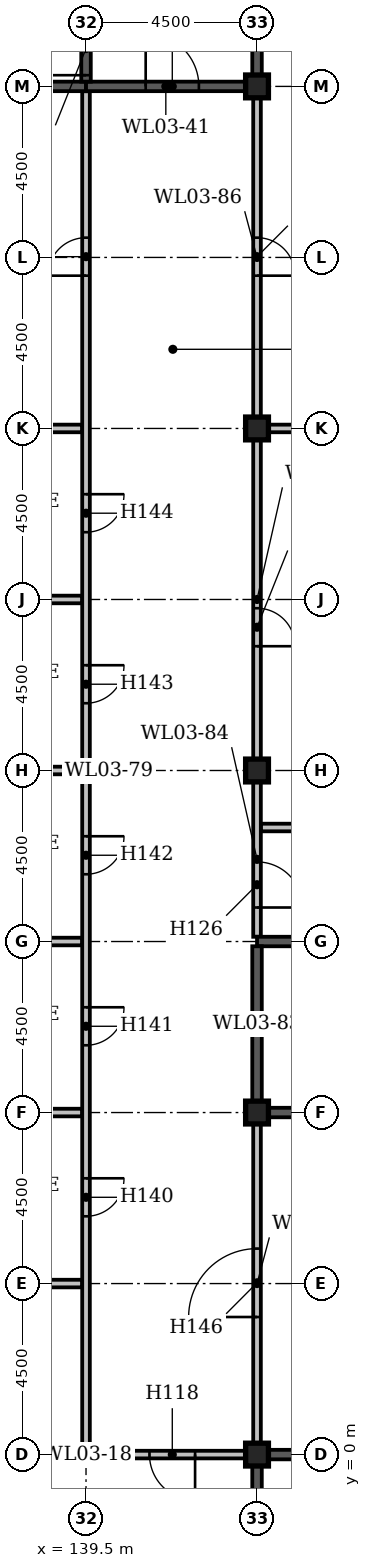
"""IFC4 building model, lengths in metres.
Left out: names, types, materials, properties, quantities, classifications, styles, units other than length and angle.
Written with IfcOpenShell. Run it as: python <this file> out.ifc"""

import sys

from ifc_helpers import new_model, si_unit, direction, frame, frame_2d, origin, origin_2d, place, context, subcontext, project, spatial, rectangle, extrude, element, fill, save


model = new_model("IFC4")
c1 = context("Model", 3, precision=1e-05, world=origin(), true_north=direction((0.0, 1.0)))
c2 = subcontext(c1, "Body", "Model", "MODEL_VIEW")
j1 = project(units=[si_unit("LENGTHUNIT", "METRE"), si_unit("PLANEANGLEUNIT", "RADIAN")], contexts=[c1])
p1 = place(None, origin())
s1 = spatial("IfcSite", under=j1, at=p1, CompositionType="ELEMENT")
p2 = place(p1, origin())
s2 = spatial("IfcBuilding", under=s1, at=p2, CompositionType="ELEMENT")
p3 = place(p2, frame((0.0, 0.0, 19.0)))
s3 = spatial("IfcBuildingStorey", under=s2, at=p3, CompositionType="ELEMENT", Elevation=19.0)
for number, where, z_axis, x_axis in (
    (1, (144.0, 0.0, 0.0), (0.0, 0.0, 1.0), (1.0, 0.0, 0.0)),
    (2, (144.0, 9.0, 0.0), (0.0, 0.0, 1.0), (1.0, 0.0, 0.0)),
    (3, (144.0, 18.0, 0.0), (0.0, 0.0, 1.0), (1.0, 0.0, 0.0)),
    (4, (144.0, 27.0, 0.0), (0.0, 0.0, 1.0), (1.0, 0.0, 0.0)),
    (5, (144.0, 36.0, 0.0), (0.0, 0.0, 1.0), (1.0, 0.0, 0.0)),
):
    element("IfcColumn", number, at=place(p3, frame(where, z_axis=z_axis, x_axis=x_axis)), inside=s3, PredefinedType="COLUMN", context=c2, shape_type="SweptSolid", body=[
        extrude(rectangle(XDim=0.6, YDim=0.6, at=origin_2d()), origin(), (0.0, 0.0, 1.0), 4.7),
    ])
p4 = place(p3, frame((135.4, 0.0, 0.0), z_axis=(0.0, 0.0, 1.0), x_axis=(1.0, 0.0, 0.0)))
e6 = element("IfcWall", 6, at=p4, inside=s3, PredefinedType="STANDARD", context=c2, shape_type="SweptSolid", body=[
    extrude(rectangle(XDim=8.3, YDim=0.2, at=frame_2d((4.15, 0.0))), origin(), (0.0, 0.0, 1.0), 4.7),
])
p5 = place(p4, frame((5.77, 0.0, 0.0)))
e7 = element("IfcOpeningElement", 7, at=p5, cuts=e6, PredefinedType="OPENING", context=c2, shape_type="SweptSolid", body=[
    extrude(rectangle(XDim=1.2, YDim=2.1, at=frame_2d((0.6, 1.05))), frame((0.0, 0.112, 0.0), z_axis=(0.0, -1.0, 0.0), x_axis=(1.0, 0.0, 0.0)), (0.0, 0.0, 1.0), 0.224),
])
p6 = place(p4, frame((1.37, 0.0, 0.0)))
e8 = element("IfcOpeningElement", 8, at=p6, cuts=e6, PredefinedType="OPENING", context=c2, shape_type="SweptSolid", body=[
    extrude(rectangle(XDim=1.0, YDim=2.1, at=frame_2d((0.5, 1.05))), frame((0.0, 0.112, 0.0), z_axis=(0.0, -1.0, 0.0), x_axis=(1.0, 0.0, 0.0)), (0.0, 0.0, 1.0), 0.224),
])
p7 = place(p3, frame((144.3, 0.0, 0.0), z_axis=(0.0, 0.0, 1.0), x_axis=(1.0, 0.0, 0.0)))
e9 = element("IfcWall", 9, at=p7, inside=s3, PredefinedType="STANDARD", context=c2, shape_type="SweptSolid", body=[
    extrude(rectangle(XDim=4.2, YDim=0.25, at=frame_2d((2.1, 0.0))), origin(), (0.0, 0.0, 1.0), 5.0),
])
p8 = place(p3, frame((135.25, 4.5, 0.0), z_axis=(0.0, 0.0, 1.0), x_axis=(1.0, 0.0, 0.0)))
e10 = element("IfcWall", 10, at=p8, inside=s3, PredefinedType="STANDARD", context=c2, shape_type="SweptSolid", body=[
    extrude(rectangle(XDim=4.15, YDim=0.2, at=frame_2d((2.075, 0.0))), origin(), (0.0, 0.0, 1.0), 4.7),
])
p9 = place(p3, frame((135.4, 9.0, 0.0), z_axis=(0.0, 0.0, 1.0), x_axis=(1.0, 0.0, 0.0)))
e11 = element("IfcWall", 11, at=p9, inside=s3, PredefinedType="STANDARD", context=c2, shape_type="SweptSolid", body=[
    extrude(rectangle(XDim=4.0, YDim=0.2, at=frame_2d((2.0, 0.0))), origin(), (0.0, 0.0, 1.0), 4.7),
])
p10 = place(p3, frame((144.3, 9.0, 0.0), z_axis=(0.0, 0.0, 1.0), x_axis=(1.0, 0.0, 0.0)))
e12 = element("IfcWall", 12, at=p10, inside=s3, PredefinedType="STANDARD", context=c2, shape_type="SweptSolid", body=[
    extrude(rectangle(XDim=4.2, YDim=0.25, at=frame_2d((2.1, 0.0))), origin(), (0.0, 0.0, 1.0), 5.0),
])
p11 = place(p3, frame((135.25, 13.5, 0.0), z_axis=(0.0, 0.0, 1.0), x_axis=(1.0, 0.0, 0.0)))
e13 = element("IfcWall", 13, at=p11, inside=s3, PredefinedType="STANDARD", context=c2, shape_type="SweptSolid", body=[
    extrude(rectangle(XDim=4.15, YDim=0.2, at=frame_2d((2.075, 0.0))), origin(), (0.0, 0.0, 1.0), 4.7),
])
p12 = place(p3, frame((144.0, 13.5, 0.0), z_axis=(0.0, 0.0, 1.0), x_axis=(1.0, 0.0, 0.0)))
e14 = element("IfcWall", 14, at=p12, inside=s3, PredefinedType="STANDARD", context=c2, shape_type="SweptSolid", body=[
    extrude(rectangle(XDim=4.5, YDim=0.25, at=frame_2d((2.25, 0.0))), origin(), (0.0, 0.0, 1.0), 5.0),
])
p13 = place(p12, frame((1.72, 0.0, 0.0)))
e15 = element("IfcOpeningElement", 15, at=p13, cuts=e14, PredefinedType="OPENING", context=c2, shape_type="SweptSolid", body=[
    extrude(rectangle(XDim=1.1, YDim=2.1, at=frame_2d((0.55, 1.05))), frame((0.0, 0.137, 0.0), z_axis=(0.0, -1.0, 0.0), x_axis=(1.0, 0.0, 0.0)), (0.0, 0.0, 1.0), 0.274),
])
p14 = place(p3, frame((144.1, 16.5, 0.0), z_axis=(0.0, 0.0, 1.0), x_axis=(1.0, 0.0, 0.0)))
e16 = element("IfcWall", 16, at=p14, inside=s3, PredefinedType="STANDARD", context=c2, shape_type="SweptSolid", body=[
    extrude(rectangle(XDim=8.725, YDim=0.2, at=frame_2d((4.362, 0.0))), origin(), (0.0, 0.0, 1.0), 4.7),
])
p15 = place(p3, frame((135.4, 18.0, 0.0), z_axis=(0.0, 0.0, 1.0), x_axis=(1.0, 0.0, 0.0)))
e17 = element("IfcWall", 17, at=p15, inside=s3, PredefinedType="STANDARD", context=c2, shape_type="SweptSolid", body=[
    extrude(rectangle(XDim=4.0, YDim=0.2, at=frame_2d((2.0, 0.0))), origin(), (0.0, 0.0, 1.0), 4.7),
])
p16 = place(p3, frame((135.25, 22.5, 0.0), z_axis=(0.0, 0.0, 1.0), x_axis=(1.0, 0.0, 0.0)))
e18 = element("IfcWall", 18, at=p16, inside=s3, PredefinedType="STANDARD", context=c2, shape_type="SweptSolid", body=[
    extrude(rectangle(XDim=4.15, YDim=0.2, at=frame_2d((2.075, 0.0))), origin(), (0.0, 0.0, 1.0), 4.7),
])
p17 = place(p3, frame((135.4, 27.0, 0.0), z_axis=(0.0, 0.0, 1.0), x_axis=(1.0, 0.0, 0.0)))
e19 = element("IfcWall", 19, at=p17, inside=s3, PredefinedType="STANDARD", context=c2, shape_type="SweptSolid", body=[
    extrude(rectangle(XDim=4.0, YDim=0.2, at=frame_2d((2.0, 0.0))), origin(), (0.0, 0.0, 1.0), 4.7),
])
p18 = place(p3, frame((144.3, 27.0, 0.0), z_axis=(0.0, 0.0, 1.0), x_axis=(1.0, 0.0, 0.0)))
e20 = element("IfcWall", 20, at=p18, inside=s3, PredefinedType="STANDARD", context=c2, shape_type="SweptSolid", body=[
    extrude(rectangle(XDim=8.4, YDim=0.2, at=frame_2d((4.2, 0.0))), origin(), (0.0, 0.0, 1.0), 4.7),
])
p19 = place(p3, frame((135.3, 36.0, 0.0), z_axis=(0.0, 0.0, 1.0), x_axis=(1.0, 0.0, 0.0)))
e21 = element("IfcWall", 21, at=p19, inside=s3, PredefinedType="STANDARD", context=c2, shape_type="SweptSolid", body=[
    extrude(rectangle(XDim=4.2, YDim=0.25, at=frame_2d((2.1, 0.0))), origin(), (0.0, 0.0, 1.0), 5.0),
])
p20 = place(p3, frame((139.5, 36.0, 0.0), z_axis=(0.0, 0.0, 1.0), x_axis=(1.0, 0.0, 0.0)))
e22 = element("IfcWall", 22, at=p20, inside=s3, PredefinedType="STANDARD", context=c2, shape_type="SweptSolid", body=[
    extrude(rectangle(XDim=4.2, YDim=0.25, at=frame_2d((2.1, 0.0))), origin(), (0.0, 0.0, 1.0), 4.7),
])
p21 = place(p20, frame((1.57, 0.0, 0.0)))
e23 = element("IfcOpeningElement", 23, at=p21, cuts=e22, PredefinedType="OPENING", context=c2, shape_type="SweptSolid", body=[
    extrude(rectangle(XDim=1.4, YDim=2.1, at=frame_2d((0.7, 1.05))), frame((0.0, 0.137, 0.0), z_axis=(0.0, -1.0, 0.0), x_axis=(1.0, 0.0, 0.0)), (0.0, 0.0, 1.0), 0.274),
])
p22 = place(p3, frame((139.5, 0.1, 0.0), z_axis=(0.0, 0.0, 1.0), x_axis=(0.0, 1.0, 0.0)))
e24 = element("IfcWall", 24, at=p22, inside=s3, PredefinedType="STANDARD", context=c2, shape_type="SweptSolid", body=[
    extrude(rectangle(XDim=35.775, YDim=0.2, at=frame_2d((17.887, 0.0))), origin(), (0.0, 0.0, 1.0), 4.7),
])
p23 = place(p22, frame((6.17, 0.0, 0.0)))
e25 = element("IfcOpeningElement", 25, at=p23, cuts=e24, PredefinedType="OPENING", context=c2, shape_type="SweptSolid", body=[
    extrude(rectangle(XDim=1.0, YDim=2.1, at=frame_2d((0.5, 1.05))), frame((0.0, 0.112, 0.0), z_axis=(0.0, -1.0, 0.0), x_axis=(1.0, 0.0, 0.0)), (0.0, 0.0, 1.0), 0.224),
])
p24 = place(p22, frame((10.67, 0.0, 0.0)))
e26 = element("IfcOpeningElement", 26, at=p24, cuts=e24, PredefinedType="OPENING", context=c2, shape_type="SweptSolid", body=[
    extrude(rectangle(XDim=1.0, YDim=2.1, at=frame_2d((0.5, 1.05))), frame((0.0, 0.112, 0.0), z_axis=(0.0, -1.0, 0.0), x_axis=(1.0, 0.0, 0.0)), (0.0, 0.0, 1.0), 0.224),
])
p25 = place(p22, frame((15.17, 0.0, 0.0)))
e27 = element("IfcOpeningElement", 27, at=p25, cuts=e24, PredefinedType="OPENING", context=c2, shape_type="SweptSolid", body=[
    extrude(rectangle(XDim=1.0, YDim=2.1, at=frame_2d((0.5, 1.05))), frame((0.0, 0.112, 0.0), z_axis=(0.0, -1.0, 0.0), x_axis=(1.0, 0.0, 0.0)), (0.0, 0.0, 1.0), 0.224),
])
p26 = place(p22, frame((19.67, 0.0, 0.0)))
e28 = element("IfcOpeningElement", 28, at=p26, cuts=e24, PredefinedType="OPENING", context=c2, shape_type="SweptSolid", body=[
    extrude(rectangle(XDim=1.0, YDim=2.1, at=frame_2d((0.5, 1.05))), frame((0.0, 0.112, 0.0), z_axis=(0.0, -1.0, 0.0), x_axis=(1.0, 0.0, 0.0)), (0.0, 0.0, 1.0), 0.224),
])
p27 = place(p22, frame((24.17, 0.0, 0.0)))
e29 = element("IfcOpeningElement", 29, at=p27, cuts=e24, PredefinedType="OPENING", context=c2, shape_type="SweptSolid", body=[
    extrude(rectangle(XDim=1.0, YDim=2.1, at=frame_2d((0.5, 1.05))), frame((0.0, 0.112, 0.0), z_axis=(0.0, -1.0, 0.0), x_axis=(1.0, 0.0, 0.0)), (0.0, 0.0, 1.0), 0.224),
])
p28 = place(p22, frame((30.92, 0.0, 0.0)))
e30 = element("IfcOpeningElement", 30, at=p28, cuts=e24, PredefinedType="OPENING", context=c2, shape_type="SweptSolid", body=[
    extrude(rectangle(XDim=1.0, YDim=2.1, at=frame_2d((0.5, 1.05))), frame((0.0, 0.112, 0.0), z_axis=(0.0, -1.0, 0.0), x_axis=(1.0, 0.0, 0.0)), (0.0, 0.0, 1.0), 0.224),
])
p29 = place(p3, frame((139.5, 36.125, 0.0), z_axis=(0.0, 0.0, 1.0), x_axis=(0.0, 1.0, 0.0)))
e31 = element("IfcWall", 31, at=p29, inside=s3, PredefinedType="STANDARD", context=c2, shape_type="SweptSolid", body=[
    extrude(rectangle(XDim=8.7, YDim=0.25, at=frame_2d((4.35, 0.0))), origin(), (0.0, 0.0, 1.0), 5.0),
])
p30 = place(p29, frame((0.17, 0.0, 0.0)))
e32 = element("IfcOpeningElement", 32, at=p30, cuts=e31, PredefinedType="OPENING", context=c2, shape_type="SweptSolid", body=[
    extrude(rectangle(XDim=1.4, YDim=2.1, at=frame_2d((0.7, 1.05))), frame((0.0, 0.137, 0.0), z_axis=(0.0, -1.0, 0.0), x_axis=(1.0, 0.0, 0.0)), (0.0, 0.0, 1.0), 0.274),
])
p31 = place(p3, frame((144.0, -8.7, 0.0), z_axis=(0.0, 0.0, 1.0), x_axis=(0.0, 1.0, 0.0)))
e33 = element("IfcWall", 33, at=p31, inside=s3, PredefinedType="STANDARD", context=c2, shape_type="SweptSolid", body=[
    extrude(rectangle(XDim=8.4, YDim=0.25, at=frame_2d((4.2, 0.0))), origin(), (0.0, 0.0, 1.0), 5.0),
])
p32 = place(p31, frame((0.12, 0.0, 0.0)))
e34 = element("IfcOpeningElement", 34, at=p32, cuts=e33, PredefinedType="OPENING", context=c2, shape_type="SweptSolid", body=[
    extrude(rectangle(XDim=1.2, YDim=2.1, at=frame_2d((0.6, 1.05))), frame((0.0, 0.137, 0.0), z_axis=(0.0, -1.0, 0.0), x_axis=(1.0, 0.0, 0.0)), (0.0, 0.0, 1.0), 0.274),
])
p33 = place(p3, frame((144.0, 0.3, 0.0), z_axis=(0.0, 0.0, 1.0), x_axis=(0.0, 1.0, 0.0)))
e35 = element("IfcWall", 35, at=p33, inside=s3, PredefinedType="STANDARD", context=c2, shape_type="SweptSolid", body=[
    extrude(rectangle(XDim=8.4, YDim=0.2, at=frame_2d((4.2, 0.0))), origin(), (0.0, 0.0, 1.0), 4.7),
])
p34 = place(p33, frame((3.32, 0.0, 0.0)))
e36 = element("IfcOpeningElement", 36, at=p34, cuts=e35, PredefinedType="OPENING", context=c2, shape_type="SweptSolid", body=[
    extrude(rectangle(XDim=1.8, YDim=2.4, at=frame_2d((0.9, 1.2))), frame((0.0, 0.112, 0.0), z_axis=(0.0, -1.0, 0.0), x_axis=(1.0, 0.0, 0.0)), (0.0, 0.0, 1.0), 0.224),
])
p35 = place(p3, frame((144.0, 9.3, 0.0), z_axis=(0.0, 0.0, 1.0), x_axis=(0.0, 1.0, 0.0)))
e37 = element("IfcWall", 37, at=p35, inside=s3, PredefinedType="STANDARD", context=c2, shape_type="SweptSolid", body=[
    extrude(rectangle(XDim=4.075, YDim=0.25, at=frame_2d((2.038, 0.0))), origin(), (0.0, 0.0, 1.0), 5.0),
])
p36 = place(p3, frame((144.0, 13.625, 0.0), z_axis=(0.0, 0.0, 1.0), x_axis=(0.0, 1.0, 0.0)))
e38 = element("IfcWall", 38, at=p36, inside=s3, PredefinedType="STANDARD", context=c2, shape_type="SweptSolid", body=[
    extrude(rectangle(XDim=4.075, YDim=0.2, at=frame_2d((2.038, 0.0))), origin(), (0.0, 0.0, 1.0), 4.7),
])
p37 = place(p36, frame((0.77, 0.0, 0.0)))
e39 = element("IfcOpeningElement", 39, at=p37, cuts=e38, PredefinedType="OPENING", context=c2, shape_type="SweptSolid", body=[
    extrude(rectangle(XDim=1.2, YDim=2.1, at=frame_2d((0.6, 1.05))), frame((0.0, 0.112, 0.0), z_axis=(0.0, -1.0, 0.0), x_axis=(1.0, 0.0, 0.0)), (0.0, 0.0, 1.0), 0.224),
])
p38 = place(p3, frame((144.0, 18.3, 0.0), z_axis=(0.0, 0.0, 1.0), x_axis=(0.0, 1.0, 0.0)))
e40 = element("IfcWall", 40, at=p38, inside=s3, PredefinedType="STANDARD", context=c2, shape_type="SweptSolid", body=[
    extrude(rectangle(XDim=8.4, YDim=0.2, at=frame_2d((4.2, 0.0))), origin(), (0.0, 0.0, 1.0), 4.7),
])
p39 = place(p38, frame((2.97, 0.0, 0.0)))
e41 = element("IfcOpeningElement", 41, at=p39, cuts=e40, PredefinedType="OPENING", context=c2, shape_type="SweptSolid", body=[
    extrude(rectangle(XDim=1.0, YDim=2.1, at=frame_2d((0.5, 1.05))), frame((0.0, 0.112, 0.0), z_axis=(0.0, -1.0, 0.0), x_axis=(1.0, 0.0, 0.0)), (0.0, 0.0, 1.0), 0.224),
])
p40 = place(p3, frame((144.0, 27.3, 0.0), z_axis=(0.0, 0.0, 1.0), x_axis=(0.0, 1.0, 0.0)))
e42 = element("IfcWall", 42, at=p40, inside=s3, PredefinedType="STANDARD", context=c2, shape_type="SweptSolid", body=[
    extrude(rectangle(XDim=8.4, YDim=0.2, at=frame_2d((4.2, 0.0))), origin(), (0.0, 0.0, 1.0), 4.7),
])
p41 = place(p40, frame((3.72, 0.0, 0.0)))
e43 = element("IfcOpeningElement", 43, at=p41, cuts=e42, PredefinedType="OPENING", context=c2, shape_type="SweptSolid", body=[
    extrude(rectangle(XDim=1.0, YDim=2.1, at=frame_2d((0.5, 1.05))), frame((0.0, 0.112, 0.0), z_axis=(0.0, -1.0, 0.0), x_axis=(1.0, 0.0, 0.0)), (0.0, 0.0, 1.0), 0.224),
])
p42 = place(p3, frame((144.0, 36.3, 0.0), z_axis=(0.0, 0.0, 1.0), x_axis=(0.0, 1.0, 0.0)))
e44 = element("IfcWall", 44, at=p42, inside=s3, PredefinedType="STANDARD", context=c2, shape_type="SweptSolid", body=[
    extrude(rectangle(XDim=8.4, YDim=0.25, at=frame_2d((4.2, 0.0))), origin(), (0.0, 0.0, 1.0), 4.7),
])
p43 = place(p5, origin())
e45 = element("IfcDoor", 45, at=p43, inside=s3, OperationType="SINGLE_SWING_RIGHT", PredefinedType="DOOR", context=c2, shape_type="SweptSolid", body=[
    extrude(rectangle(XDim=1.2, YDim=2.1, at=frame_2d((0.6, 1.05))), frame((0.0, 0.025, 0.0), z_axis=(0.0, -1.0, 0.0), x_axis=(1.0, 0.0, 0.0)), (0.0, 0.0, 1.0), 0.05),
])
fill(e7, e45)
p44 = place(p30, origin())
e46 = element("IfcDoor", 46, at=p44, inside=s3, OperationType="DOUBLE_DOOR_SINGLE_SWING", PredefinedType="DOOR", context=c2, shape_type="SweptSolid", body=[
    extrude(rectangle(XDim=1.4, YDim=2.1, at=frame_2d((0.7, 1.05))), frame((0.0, 0.025, 0.0), z_axis=(0.0, -1.0, 0.0), x_axis=(1.0, 0.0, 0.0)), (0.0, 0.0, 1.0), 0.05),
])
fill(e32, e46)
p45 = place(p21, origin())
e47 = element("IfcDoor", 47, at=p45, inside=s3, OperationType="DOUBLE_DOOR_SINGLE_SWING", PredefinedType="DOOR", context=c2, shape_type="SweptSolid", body=[
    extrude(rectangle(XDim=1.4, YDim=2.1, at=frame_2d((0.7, 1.05))), frame((0.0, 0.025, 0.0), z_axis=(0.0, -1.0, 0.0), x_axis=(1.0, 0.0, 0.0)), (0.0, 0.0, 1.0), 0.05),
])
fill(e23, e47)
p46 = place(p37, frame((1.2, 0.0, 0.0), z_axis=(0.0, 0.0, 1.0), x_axis=(-1.0, 0.0, 0.0)))
e48 = element("IfcDoor", 48, at=p46, inside=s3, OperationType="SINGLE_SWING_RIGHT", PredefinedType="DOOR", context=c2, shape_type="SweptSolid", body=[
    extrude(rectangle(XDim=1.2, YDim=2.1, at=frame_2d((0.6, 1.05))), frame((0.0, 0.025, 0.0), z_axis=(0.0, -1.0, 0.0), x_axis=(1.0, 0.0, 0.0)), (0.0, 0.0, 1.0), 0.05),
])
fill(e39, e48)
p47 = place(p23, origin())
e49 = element("IfcDoor", 49, at=p47, inside=s3, OperationType="SINGLE_SWING_RIGHT", PredefinedType="DOOR", context=c2, shape_type="SweptSolid", body=[
    extrude(rectangle(XDim=1.0, YDim=2.1, at=frame_2d((0.5, 1.05))), frame((0.0, 0.025, 0.0), z_axis=(0.0, -1.0, 0.0), x_axis=(1.0, 0.0, 0.0)), (0.0, 0.0, 1.0), 0.05),
])
fill(e25, e49)
p48 = place(p24, origin())
e50 = element("IfcDoor", 50, at=p48, inside=s3, OperationType="SINGLE_SWING_RIGHT", PredefinedType="DOOR", context=c2, shape_type="SweptSolid", body=[
    extrude(rectangle(XDim=1.0, YDim=2.1, at=frame_2d((0.5, 1.05))), frame((0.0, 0.025, 0.0), z_axis=(0.0, -1.0, 0.0), x_axis=(1.0, 0.0, 0.0)), (0.0, 0.0, 1.0), 0.05),
])
fill(e26, e50)
p49 = place(p25, origin())
e51 = element("IfcDoor", 51, at=p49, inside=s3, OperationType="SINGLE_SWING_RIGHT", PredefinedType="DOOR", context=c2, shape_type="SweptSolid", body=[
    extrude(rectangle(XDim=1.0, YDim=2.1, at=frame_2d((0.5, 1.05))), frame((0.0, 0.025, 0.0), z_axis=(0.0, -1.0, 0.0), x_axis=(1.0, 0.0, 0.0)), (0.0, 0.0, 1.0), 0.05),
])
fill(e27, e51)
p50 = place(p26, origin())
e52 = element("IfcDoor", 52, at=p50, inside=s3, OperationType="SINGLE_SWING_RIGHT", PredefinedType="DOOR", context=c2, shape_type="SweptSolid", body=[
    extrude(rectangle(XDim=1.0, YDim=2.1, at=frame_2d((0.5, 1.05))), frame((0.0, 0.025, 0.0), z_axis=(0.0, -1.0, 0.0), x_axis=(1.0, 0.0, 0.0)), (0.0, 0.0, 1.0), 0.05),
])
fill(e28, e52)
p51 = place(p27, origin())
e53 = element("IfcDoor", 53, at=p51, inside=s3, OperationType="SINGLE_SWING_RIGHT", PredefinedType="DOOR", context=c2, shape_type="SweptSolid", body=[
    extrude(rectangle(XDim=1.0, YDim=2.1, at=frame_2d((0.5, 1.05))), frame((0.0, 0.025, 0.0), z_axis=(0.0, -1.0, 0.0), x_axis=(1.0, 0.0, 0.0)), (0.0, 0.0, 1.0), 0.05),
])
fill(e29, e53)
p52 = place(p28, origin())
e54 = element("IfcDoor", 54, at=p52, inside=s3, OperationType="SINGLE_SWING_LEFT", PredefinedType="DOOR", context=c2, shape_type="SweptSolid", body=[
    extrude(rectangle(XDim=1.0, YDim=2.1, at=frame_2d((0.5, 1.05))), frame((0.0, 0.025, 0.0), z_axis=(0.0, -1.0, 0.0), x_axis=(1.0, 0.0, 0.0)), (0.0, 0.0, 1.0), 0.05),
])
fill(e30, e54)
p53 = place(p34, origin())
e55 = element("IfcDoor", 55, at=p53, inside=s3, OperationType="DOUBLE_DOOR_SINGLE_SWING", PredefinedType="DOOR", context=c2, shape_type="SweptSolid", body=[
    extrude(rectangle(XDim=1.8, YDim=2.4, at=frame_2d((0.9, 1.2))), frame((0.0, 0.025, 0.0), z_axis=(0.0, -1.0, 0.0), x_axis=(1.0, 0.0, 0.0)), (0.0, 0.0, 1.0), 0.05),
])
fill(e36, e55)
p54 = place(p39, frame((1.0, 0.0, 0.0), z_axis=(0.0, 0.0, 1.0), x_axis=(-1.0, 0.0, 0.0)))
e56 = element("IfcDoor", 56, at=p54, inside=s3, OperationType="SINGLE_SWING_RIGHT", PredefinedType="DOOR", context=c2, shape_type="SweptSolid", body=[
    extrude(rectangle(XDim=1.0, YDim=2.1, at=frame_2d((0.5, 1.05))), frame((0.0, 0.025, 0.0), z_axis=(0.0, -1.0, 0.0), x_axis=(1.0, 0.0, 0.0)), (0.0, 0.0, 1.0), 0.05),
])
fill(e41, e56)
p55 = place(p41, frame((1.0, 0.0, 0.0), z_axis=(0.0, 0.0, 1.0), x_axis=(-1.0, 0.0, 0.0)))
e57 = element("IfcDoor", 57, at=p55, inside=s3, OperationType="SINGLE_SWING_RIGHT", PredefinedType="DOOR", context=c2, shape_type="SweptSolid", body=[
    extrude(rectangle(XDim=1.0, YDim=2.1, at=frame_2d((0.5, 1.05))), frame((0.0, 0.025, 0.0), z_axis=(0.0, -1.0, 0.0), x_axis=(1.0, 0.0, 0.0)), (0.0, 0.0, 1.0), 0.05),
])
fill(e43, e57)
save(model, sys.argv[1])
